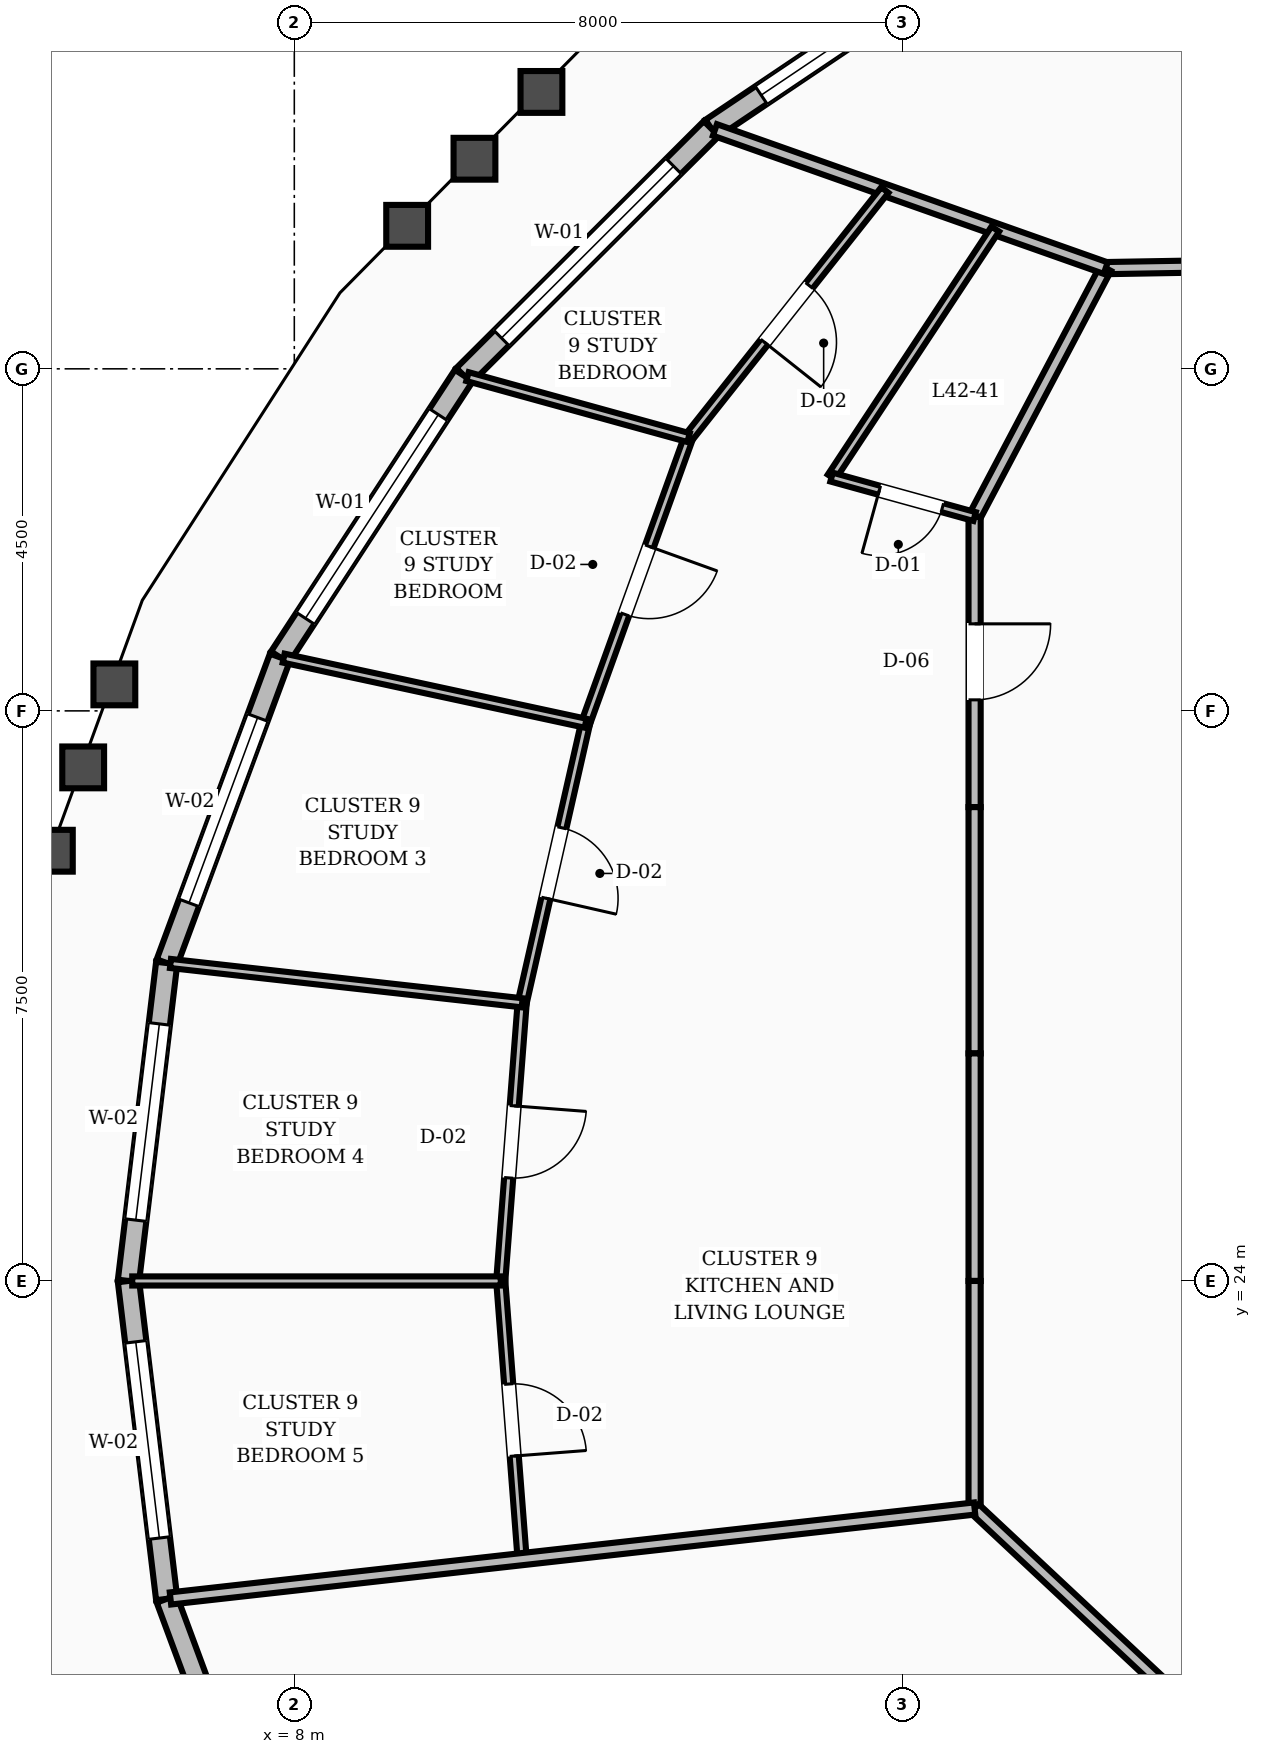
"""IFC4 building model, lengths in metres.
Left out: names, types, materials, properties, quantities, classifications, styles, units other than length and angle.
Written with IfcOpenShell. Run it as: python <this file> out.ifc"""

import sys

from ifc_helpers import new_model, si_unit, direction, frame, frame_2d, origin, place, context, subcontext, project, spatial, rectangle, extrude, element, fill, save


model = new_model("IFC4")
c1 = context("Model", 3, precision=1e-05, world=origin(), true_north=direction((0.0, 1.0)))
c2 = subcontext(c1, "Body", "Model", "MODEL_VIEW")
j1 = project(units=[si_unit("LENGTHUNIT", "METRE"), si_unit("PLANEANGLEUNIT", "RADIAN")], contexts=[c1])
p1 = place(None, origin())
s1 = spatial("IfcSite", under=j1, at=p1, CompositionType="ELEMENT")
p2 = place(p1, origin())
s2 = spatial("IfcBuilding", under=s1, at=p2, CompositionType="ELEMENT")
p3 = place(p2, frame((0.0, 0.0, 164.0)))
s3 = spatial("IfcBuildingStorey", under=s2, at=p3, CompositionType="ELEMENT", Elevation=164.0)
p4 = place(p3, frame((17.454, 41.826, 0.0), z_axis=(0.0, 0.0, 1.0), x_axis=(-0.829970169982, -0.55780777777, 0.0)))
e1 = element("IfcWall", 1, at=p4, inside=s3, PredefinedType="STANDARD", context=c2, shape_type="SweptSolid", body=[
    extrude(rectangle(XDim=4.78, YDim=0.28, at=frame_2d((2.39, 0.0))), origin(), (0.0, 0.0, 1.0), 2.82),
])
p5 = place(p4, frame((0.79, 0.0, 0.8)))
e2 = element("IfcOpeningElement", 2, at=p5, cuts=e1, PredefinedType="OPENING", context=c2, shape_type="SweptSolid", body=[
    extrude(rectangle(XDim=3.2, YDim=1.65, at=frame_2d((1.6, 0.825))), frame((0.0, 0.15, 0.0), z_axis=(0.0, -1.0, 0.0), x_axis=(1.0, 0.0, 0.0)), (0.0, 0.0, 1.0), 0.3),
])
p6 = place(p3, frame((13.486, 39.16, 0.0), z_axis=(0.0, 0.0, 1.0), x_axis=(-0.70790250433, -0.706310161589, 0.0)))
e3 = element("IfcWall", 3, at=p6, inside=s3, PredefinedType="STANDARD", context=c2, shape_type="SweptSolid", body=[
    extrude(rectangle(XDim=4.6, YDim=0.28, at=frame_2d((2.3, 0.0))), origin(), (0.0, 0.0, 1.0), 2.82),
])
p7 = place(p6, frame((0.7, 0.0, 0.8)))
e4 = element("IfcOpeningElement", 4, at=p7, cuts=e3, PredefinedType="OPENING", context=c2, shape_type="SweptSolid", body=[
    extrude(rectangle(XDim=3.2, YDim=1.65, at=frame_2d((1.6, 0.825))), frame((0.0, 0.15, 0.0), z_axis=(0.0, -1.0, 0.0), x_axis=(1.0, 0.0, 0.0)), (0.0, 0.0, 1.0), 0.3),
])
p8 = place(p3, frame((10.23, 35.911, 0.0), z_axis=(0.0, 0.0, 1.0), x_axis=(-0.546604237051, -0.837391072342, 0.0)))
e5 = element("IfcWall", 5, at=p8, inside=s3, PredefinedType="STANDARD", context=c2, shape_type="SweptSolid", body=[
    extrude(rectangle(XDim=4.426, YDim=0.28, at=frame_2d((2.213, 0.0))), origin(), (0.0, 0.0, 1.0), 2.82),
])
p9 = place(p8, frame((0.613, 0.0, 0.8)))
e6 = element("IfcOpeningElement", 6, at=p9, cuts=e5, PredefinedType="OPENING", context=c2, shape_type="SweptSolid", body=[
    extrude(rectangle(XDim=3.2, YDim=1.65, at=frame_2d((1.6, 0.825))), frame((0.0, 0.15, 0.0), z_axis=(0.0, -1.0, 0.0), x_axis=(1.0, 0.0, 0.0)), (0.0, 0.0, 1.0), 0.3),
])
p10 = place(p3, frame((7.811, 32.205, 0.0), z_axis=(0.0, 0.0, 1.0), x_axis=(-0.347390364115, -0.937720606002, 0.0)))
e7 = element("IfcWall", 7, at=p10, inside=s3, PredefinedType="STANDARD", context=c2, shape_type="SweptSolid", body=[
    extrude(rectangle(XDim=4.289, YDim=0.28, at=frame_2d((2.145, 0.0))), origin(), (0.0, 0.0, 1.0), 2.82),
])
p11 = place(p10, frame((0.844, 0.0, 0.8)))
e8 = element("IfcOpeningElement", 8, at=p11, cuts=e7, PredefinedType="OPENING", context=c2, shape_type="SweptSolid", body=[
    extrude(rectangle(XDim=2.6, YDim=1.65, at=frame_2d((1.3, 0.825))), frame((0.0, 0.15, 0.0), z_axis=(0.0, -1.0, 0.0), x_axis=(1.0, 0.0, 0.0)), (0.0, 0.0, 1.0), 0.3),
])
p12 = place(p3, frame((6.321, 28.183, 0.0), z_axis=(0.0, 0.0, 1.0), x_axis=(-0.119382878751, -0.992848290657, 0.0)))
e9 = element("IfcWall", 9, at=p12, inside=s3, PredefinedType="STANDARD", context=c2, shape_type="SweptSolid", body=[
    extrude(rectangle(XDim=4.213, YDim=0.28, at=frame_2d((2.106, 0.0))), origin(), (0.0, 0.0, 1.0), 2.82),
])
p13 = place(p12, frame((0.806, 0.0, 0.8)))
e10 = element("IfcOpeningElement", 10, at=p13, cuts=e9, PredefinedType="OPENING", context=c2, shape_type="SweptSolid", body=[
    extrude(rectangle(XDim=2.6, YDim=1.65, at=frame_2d((1.3, 0.825))), frame((0.0, 0.15, 0.0), z_axis=(0.0, -1.0, 0.0), x_axis=(1.0, 0.0, 0.0)), (0.0, 0.0, 1.0), 0.3),
])
p14 = place(p3, frame((5.818, 24.0, 0.0), z_axis=(0.0, 0.0, 1.0), x_axis=(0.119382878751, -0.992848290657, 0.0)))
e11 = element("IfcWall", 11, at=p14, inside=s3, PredefinedType="STANDARD", context=c2, shape_type="SweptSolid", body=[
    extrude(rectangle(XDim=4.213, YDim=0.28, at=frame_2d((2.106, 0.0))), origin(), (0.0, 0.0, 1.0), 2.82),
])
p15 = place(p14, frame((0.806, 0.0, 0.8)))
e12 = element("IfcOpeningElement", 12, at=p15, cuts=e11, PredefinedType="OPENING", context=c2, shape_type="SweptSolid", body=[
    extrude(rectangle(XDim=2.6, YDim=1.65, at=frame_2d((1.3, 0.825))), frame((0.0, 0.15, 0.0), z_axis=(0.0, -1.0, 0.0), x_axis=(1.0, 0.0, 0.0)), (0.0, 0.0, 1.0), 0.3),
])
p16 = place(p3, frame((6.321, 19.817, 0.0), z_axis=(0.0, 0.0, 1.0), x_axis=(0.347390364115, -0.937720606002, 0.0)))
e13 = element("IfcWall", 13, at=p16, inside=s3, PredefinedType="STANDARD", context=c2, shape_type="SweptSolid", body=[
    extrude(rectangle(XDim=4.289, YDim=0.28, at=frame_2d((2.145, 0.0))), origin(), (0.0, 0.0, 1.0), 2.82),
])
p17 = place(p3, frame((23.046, 37.4, 0.0), z_axis=(0.0, 0.0, 1.0), x_axis=(-0.999853038912, -0.017143528788, 0.0)))
e14 = element("IfcWall", 14, at=p17, inside=s3, PredefinedType="SOLIDWALL", context=c2, shape_type="SweptSolid", body=[
    extrude(rectangle(XDim=4.372, YDim=0.16, at=frame_2d((2.186, 0.0))), origin(), (0.0, 0.0, 1.0), 2.8),
])
p18 = place(p3, frame((18.675, 37.325, 0.0), z_axis=(0.0, 0.0, 1.0), x_axis=(-0.466737093093, -0.884396113702, 0.0)))
e15 = element("IfcWall", 15, at=p18, inside=s3, PredefinedType="SOLIDWALL", context=c2, shape_type="SweptSolid", body=[
    extrude(rectangle(XDim=3.696, YDim=0.16, at=frame_2d((1.848, 0.0))), origin(), (0.0, 0.0, 1.0), 2.8),
])
p19 = place(p3, frame((16.95, 34.056, 0.0), z_axis=(0.0, 0.0, 1.0), x_axis=(0.0, -1.0, 0.0)))
e16 = element("IfcWall", 16, at=p19, inside=s3, PredefinedType="SOLIDWALL", context=c2, shape_type="SweptSolid", body=[
    extrude(rectangle(XDim=3.822, YDim=0.16, at=frame_2d((1.911, 0.0))), origin(), (0.0, 0.0, 1.0), 2.8),
])
p20 = place(p19, frame((1.411, 0.0, 0.0)))
e17 = element("IfcOpeningElement", 17, at=p20, cuts=e16, PredefinedType="OPENING", context=c2, shape_type="SweptSolid", body=[
    extrude(rectangle(XDim=1.0, YDim=2.1, at=frame_2d((0.5, 1.05))), frame((0.0, 0.09, 0.0), z_axis=(0.0, -1.0, 0.0), x_axis=(1.0, 0.0, 0.0)), (0.0, 0.0, 1.0), 0.18),
])
p21 = place(p3, frame((16.95, 30.234, 0.0), z_axis=(0.0, 0.0, 1.0), x_axis=(0.0, -1.0, 0.0)))
e18 = element("IfcWall", 18, at=p21, inside=s3, PredefinedType="SOLIDWALL", context=c2, shape_type="SweptSolid", body=[
    extrude(rectangle(XDim=3.24, YDim=0.16, at=frame_2d((1.62, 0.0))), origin(), (0.0, 0.0, 1.0), 2.8),
])
for number, where, z_axis, x_axis in (
    (19, (16.95, 26.994, 0.0), (0.0, 0.0, 1.0), (0.0, -1.0, 0.0)),
    (20, (16.95, 24.0, 0.0), (0.0, 0.0, 1.0), (0.0, -1.0, 0.0)),
):
    element("IfcWall", number, at=place(p3, frame(where, z_axis=z_axis, x_axis=x_axis)), inside=s3, PredefinedType="SOLIDWALL", context=c2, shape_type="SweptSolid", body=[
        extrude(rectangle(XDim=2.994, YDim=0.16, at=frame_2d((1.497, 0.0))), origin(), (0.0, 0.0, 1.0), 2.8),
    ])
p22 = place(p3, frame((16.95, 21.006, 0.0), z_axis=(0.0, 0.0, 1.0), x_axis=(0.730150682073, -0.683286163674, 0.0)))
e21 = element("IfcWall", 21, at=p22, inside=s3, PredefinedType="SOLIDWALL", context=c2, shape_type="SweptSolid", body=[
    extrude(rectangle(XDim=3.287, YDim=0.16, at=frame_2d((1.644, 0.0))), origin(), (0.0, 0.0, 1.0), 2.8),
])
p23 = place(p3, frame((18.675, 37.325, 0.0), z_axis=(0.0, 0.0, 1.0), x_axis=(-0.942778570561, 0.333419505866, 0.0)))
e22 = element("IfcWall", 22, at=p23, inside=s3, PredefinedType="SOLIDWALL", context=c2, shape_type="SweptSolid", body=[
    extrude(rectangle(XDim=5.454, YDim=0.16, at=frame_2d((2.727, 0.0))), origin(), (0.0, 0.0, 1.0), 2.8),
])
p24 = place(p3, frame((17.222, 37.839, 0.0), z_axis=(0.0, 0.0, 1.0), x_axis=(-0.550789143957, -0.834644426627, 0.0)))
e23 = element("IfcWall", 23, at=p24, inside=s3, PredefinedType="PARTITIONING", context=c2, shape_type="SweptSolid", body=[
    extrude(rectangle(XDim=3.91, YDim=0.12, at=frame_2d((1.955, 0.0))), origin(), (0.0, 0.0, 1.0), 2.8),
])
p25 = place(p3, frame((16.95, 34.056, 0.0), z_axis=(0.0, 0.0, 1.0), x_axis=(-0.963953905702, 0.266069291128, 0.0)))
e24 = element("IfcWall", 24, at=p25, inside=s3, PredefinedType="PARTITIONING", context=c2, shape_type="SweptSolid", body=[
    extrude(rectangle(XDim=1.952, YDim=0.12, at=frame_2d((0.976, 0.0))), origin(), (0.0, 0.0, 1.0), 2.8),
])
p26 = place(p25, frame((0.44, 0.0, 0.0)))
e25 = element("IfcOpeningElement", 25, at=p26, cuts=e24, PredefinedType="OPENING", context=c2, shape_type="SweptSolid", body=[
    extrude(rectangle(XDim=0.86, YDim=2.1, at=frame_2d((0.43, 1.05))), frame((0.0, 0.07, 0.0), z_axis=(0.0, -1.0, 0.0), x_axis=(1.0, 0.0, 0.0)), (0.0, 0.0, 1.0), 0.14),
])
p27 = place(p3, frame((15.769, 38.353, 0.0), z_axis=(0.0, 0.0, 1.0), x_axis=(-0.621200750132, -0.783651471023, 0.0)))
e26 = element("IfcWall", 26, at=p27, inside=s3, PredefinedType="PARTITIONING", context=c2, shape_type="SweptSolid", body=[
    extrude(rectangle(XDim=4.157, YDim=0.12, at=frame_2d((2.079, 0.0))), origin(), (0.0, 0.0, 1.0), 2.8),
])
p28 = place(p27, frame((1.604, 0.0, 0.0)))
e27 = element("IfcOpeningElement", 27, at=p28, cuts=e26, PredefinedType="OPENING", context=c2, shape_type="SweptSolid", body=[
    extrude(rectangle(XDim=0.95, YDim=2.1, at=frame_2d((0.475, 1.05))), frame((0.0, 0.07, 0.0), z_axis=(0.0, -1.0, 0.0), x_axis=(1.0, 0.0, 0.0)), (0.0, 0.0, 1.0), 0.14),
])
p29 = place(p3, frame((13.187, 35.095, 0.0), z_axis=(0.0, 0.0, 1.0), x_axis=(-0.339219380109, -0.940707293561, 0.0)))
e28 = element("IfcWall", 28, at=p29, inside=s3, PredefinedType="PARTITIONING", context=c2, shape_type="SweptSolid", body=[
    extrude(rectangle(XDim=3.994, YDim=0.12, at=frame_2d((1.997, 0.0))), origin(), (0.0, 0.0, 1.0), 2.8),
])
p30 = place(p29, frame((1.522, 0.0, 0.0)))
e29 = element("IfcOpeningElement", 29, at=p30, cuts=e28, PredefinedType="OPENING", context=c2, shape_type="SweptSolid", body=[
    extrude(rectangle(XDim=0.95, YDim=2.1, at=frame_2d((0.475, 1.05))), frame((0.0, 0.07, 0.0), z_axis=(0.0, -1.0, 0.0), x_axis=(1.0, 0.0, 0.0)), (0.0, 0.0, 1.0), 0.14),
])
p31 = place(p3, frame((13.187, 35.095, 0.0), z_axis=(0.0, 0.0, 1.0), x_axis=(-0.96395827654, 0.266053455323, 0.0)))
e30 = element("IfcWall", 30, at=p31, inside=s3, PredefinedType="PARTITIONING", context=c2, shape_type="SweptSolid", body=[
    extrude(rectangle(XDim=3.017, YDim=0.12, at=frame_2d((1.509, 0.0))), origin(), (0.0, 0.0, 1.0), 2.8),
])
p32 = place(p3, frame((11.832, 31.337, 0.0), z_axis=(0.0, 0.0, 1.0), x_axis=(-0.221198590076, -0.975228785336, 0.0)))
e31 = element("IfcWall", 31, at=p32, inside=s3, PredefinedType="PARTITIONING", context=c2, shape_type="SweptSolid", body=[
    extrude(rectangle(XDim=3.771, YDim=0.12, at=frame_2d((1.886, 0.0))), origin(), (0.0, 0.0, 1.0), 2.8),
])
p33 = place(p32, frame((1.411, 0.0, 0.0)))
e32 = element("IfcOpeningElement", 32, at=p33, cuts=e31, PredefinedType="OPENING", context=c2, shape_type="SweptSolid", body=[
    extrude(rectangle(XDim=0.95, YDim=2.1, at=frame_2d((0.475, 1.05))), frame((0.0, 0.07, 0.0), z_axis=(0.0, -1.0, 0.0), x_axis=(1.0, 0.0, 0.0)), (0.0, 0.0, 1.0), 0.14),
])
p34 = place(p3, frame((11.832, 31.337, 0.0), z_axis=(0.0, 0.0, 1.0), x_axis=(-0.977526385001, 0.210813108289, 0.0)))
e33 = element("IfcWall", 33, at=p34, inside=s3, PredefinedType="PARTITIONING", context=c2, shape_type="SweptSolid", body=[
    extrude(rectangle(XDim=4.064, YDim=0.12, at=frame_2d((2.032, 0.0))), origin(), (0.0, 0.0, 1.0), 2.8),
])
p35 = place(p3, frame((10.998, 27.659, 0.0), z_axis=(0.0, 0.0, 1.0), x_axis=(-0.07676262617, -0.997049396582, 0.0)))
e34 = element("IfcWall", 34, at=p35, inside=s3, PredefinedType="PARTITIONING", context=c2, shape_type="SweptSolid", body=[
    extrude(rectangle(XDim=3.67, YDim=0.12, at=frame_2d((1.835, 0.0))), origin(), (0.0, 0.0, 1.0), 2.8),
])
p36 = place(p35, frame((1.36, 0.0, 0.0)))
e35 = element("IfcOpeningElement", 35, at=p36, cuts=e34, PredefinedType="OPENING", context=c2, shape_type="SweptSolid", body=[
    extrude(rectangle(XDim=0.95, YDim=2.1, at=frame_2d((0.475, 1.05))), frame((0.0, 0.07, 0.0), z_axis=(0.0, -1.0, 0.0), x_axis=(1.0, 0.0, 0.0)), (0.0, 0.0, 1.0), 0.14),
])
p37 = place(p3, frame((10.998, 27.659, 0.0), z_axis=(0.0, 0.0, 1.0), x_axis=(-0.993802255483, 0.111162390209, 0.0)))
e36 = element("IfcWall", 36, at=p37, inside=s3, PredefinedType="PARTITIONING", context=c2, shape_type="SweptSolid", body=[
    extrude(rectangle(XDim=4.656, YDim=0.12, at=frame_2d((2.328, 0.0))), origin(), (0.0, 0.0, 1.0), 2.8),
])
p38 = place(p3, frame((10.716, 24.0, 0.0), z_axis=(0.0, 0.0, 1.0), x_axis=(0.07676262617, -0.997049396582, 0.0)))
e37 = element("IfcWall", 37, at=p38, inside=s3, PredefinedType="PARTITIONING", context=c2, shape_type="SweptSolid", body=[
    extrude(rectangle(XDim=3.67, YDim=0.12, at=frame_2d((1.835, 0.0))), origin(), (0.0, 0.0, 1.0), 2.8),
])
p39 = place(p38, frame((1.36, 0.0, 0.0)))
e38 = element("IfcOpeningElement", 38, at=p39, cuts=e37, PredefinedType="OPENING", context=c2, shape_type="SweptSolid", body=[
    extrude(rectangle(XDim=0.95, YDim=2.1, at=frame_2d((0.475, 1.05))), frame((0.0, 0.07, 0.0), z_axis=(0.0, -1.0, 0.0), x_axis=(1.0, 0.0, 0.0)), (0.0, 0.0, 1.0), 0.14),
])
p40 = place(p3, frame((10.716, 24.0, 0.0), z_axis=(0.0, 0.0, 1.0), x_axis=(-1.0, 0.0, 0.0)))
e39 = element("IfcWall", 39, at=p40, inside=s3, PredefinedType="PARTITIONING", context=c2, shape_type="SweptSolid", body=[
    extrude(rectangle(XDim=4.848, YDim=0.12, at=frame_2d((2.424, 0.0))), origin(), (0.0, 0.0, 1.0), 2.8),
])
p41 = place(p3, frame((16.95, 21.006, 0.0), z_axis=(0.0, 0.0, 1.0), x_axis=(-0.993802358281, -0.111161471179, 0.0)))
e40 = element("IfcWall", 40, at=p41, inside=s3, PredefinedType="SOLIDWALL", context=c2, shape_type="SweptSolid", body=[
    extrude(rectangle(XDim=10.645, YDim=0.16, at=frame_2d((5.323, 0.0))), origin(), (0.0, 0.0, 1.0), 2.8),
])
p42 = place(p5, origin())
e41 = element("IfcWindow", 41, at=p42, inside=s3, PartitioningType="SINGLE_PANEL", PredefinedType="WINDOW", context=c2, shape_type="SweptSolid", body=[
    extrude(rectangle(XDim=3.2, YDim=1.65, at=frame_2d((1.6, 0.825))), frame((0.0, 0.03, 0.0), z_axis=(0.0, -1.0, 0.0), x_axis=(1.0, 0.0, 0.0)), (0.0, 0.0, 1.0), 0.06),
])
fill(e2, e41)
p43 = place(p7, origin())
e42 = element("IfcWindow", 42, at=p43, inside=s3, PartitioningType="SINGLE_PANEL", PredefinedType="WINDOW", context=c2, shape_type="SweptSolid", body=[
    extrude(rectangle(XDim=3.2, YDim=1.65, at=frame_2d((1.6, 0.825))), frame((0.0, 0.03, 0.0), z_axis=(0.0, -1.0, 0.0), x_axis=(1.0, 0.0, 0.0)), (0.0, 0.0, 1.0), 0.06),
])
fill(e4, e42)
p44 = place(p9, origin())
e43 = element("IfcWindow", 43, at=p44, inside=s3, PartitioningType="SINGLE_PANEL", PredefinedType="WINDOW", context=c2, shape_type="SweptSolid", body=[
    extrude(rectangle(XDim=3.2, YDim=1.65, at=frame_2d((1.6, 0.825))), frame((0.0, 0.03, 0.0), z_axis=(0.0, -1.0, 0.0), x_axis=(1.0, 0.0, 0.0)), (0.0, 0.0, 1.0), 0.06),
])
fill(e6, e43)
p45 = place(p11, origin())
e44 = element("IfcWindow", 44, at=p45, inside=s3, PartitioningType="SINGLE_PANEL", PredefinedType="WINDOW", context=c2, shape_type="SweptSolid", body=[
    extrude(rectangle(XDim=2.6, YDim=1.65, at=frame_2d((1.3, 0.825))), frame((0.0, 0.03, 0.0), z_axis=(0.0, -1.0, 0.0), x_axis=(1.0, 0.0, 0.0)), (0.0, 0.0, 1.0), 0.06),
])
fill(e8, e44)
p46 = place(p13, origin())
e45 = element("IfcWindow", 45, at=p46, inside=s3, PartitioningType="SINGLE_PANEL", PredefinedType="WINDOW", context=c2, shape_type="SweptSolid", body=[
    extrude(rectangle(XDim=2.6, YDim=1.65, at=frame_2d((1.3, 0.825))), frame((0.0, 0.03, 0.0), z_axis=(0.0, -1.0, 0.0), x_axis=(1.0, 0.0, 0.0)), (0.0, 0.0, 1.0), 0.06),
])
fill(e10, e45)
p47 = place(p15, origin())
e46 = element("IfcWindow", 46, at=p47, inside=s3, PartitioningType="SINGLE_PANEL", PredefinedType="WINDOW", context=c2, shape_type="SweptSolid", body=[
    extrude(rectangle(XDim=2.6, YDim=1.65, at=frame_2d((1.3, 0.825))), frame((0.0, 0.03, 0.0), z_axis=(0.0, -1.0, 0.0), x_axis=(1.0, 0.0, 0.0)), (0.0, 0.0, 1.0), 0.06),
])
fill(e12, e46)
p48 = place(p26, origin())
e47 = element("IfcDoor", 47, at=p48, inside=s3, OperationType="SINGLE_SWING_RIGHT", PredefinedType="DOOR", context=c2, shape_type="SweptSolid", body=[
    extrude(rectangle(XDim=0.86, YDim=2.1, at=frame_2d((0.43, 1.05))), frame((0.0, 0.025, 0.0), z_axis=(0.0, -1.0, 0.0), x_axis=(1.0, 0.0, 0.0)), (0.0, 0.0, 1.0), 0.05),
])
fill(e25, e47)
p49 = place(p20, origin())
e48 = element("IfcDoor", 48, at=p49, inside=s3, OperationType="SINGLE_SWING_LEFT", PredefinedType="DOOR", context=c2, shape_type="SweptSolid", body=[
    extrude(rectangle(XDim=1.0, YDim=2.1, at=frame_2d((0.5, 1.05))), frame((0.0, 0.025, 0.0), z_axis=(0.0, -1.0, 0.0), x_axis=(1.0, 0.0, 0.0)), (0.0, 0.0, 1.0), 0.05),
])
fill(e17, e48)
p50 = place(p28, origin())
e49 = element("IfcDoor", 49, at=p50, inside=s3, OperationType="SINGLE_SWING_RIGHT", PredefinedType="DOOR", context=c2, shape_type="SweptSolid", body=[
    extrude(rectangle(XDim=0.95, YDim=2.1, at=frame_2d((0.475, 1.05))), frame((0.0, 0.025, 0.0), z_axis=(0.0, -1.0, 0.0), x_axis=(1.0, 0.0, 0.0)), (0.0, 0.0, 1.0), 0.05),
])
fill(e27, e49)
p51 = place(p30, origin())
e50 = element("IfcDoor", 50, at=p51, inside=s3, OperationType="SINGLE_SWING_LEFT", PredefinedType="DOOR", context=c2, shape_type="SweptSolid", body=[
    extrude(rectangle(XDim=0.95, YDim=2.1, at=frame_2d((0.475, 1.05))), frame((0.0, 0.025, 0.0), z_axis=(0.0, -1.0, 0.0), x_axis=(1.0, 0.0, 0.0)), (0.0, 0.0, 1.0), 0.05),
])
fill(e29, e50)
p52 = place(p33, origin())
e51 = element("IfcDoor", 51, at=p52, inside=s3, OperationType="SINGLE_SWING_RIGHT", PredefinedType="DOOR", context=c2, shape_type="SweptSolid", body=[
    extrude(rectangle(XDim=0.95, YDim=2.1, at=frame_2d((0.475, 1.05))), frame((0.0, 0.025, 0.0), z_axis=(0.0, -1.0, 0.0), x_axis=(1.0, 0.0, 0.0)), (0.0, 0.0, 1.0), 0.05),
])
fill(e32, e51)
p53 = place(p36, origin())
e52 = element("IfcDoor", 52, at=p53, inside=s3, OperationType="SINGLE_SWING_LEFT", PredefinedType="DOOR", context=c2, shape_type="SweptSolid", body=[
    extrude(rectangle(XDim=0.95, YDim=2.1, at=frame_2d((0.475, 1.05))), frame((0.0, 0.025, 0.0), z_axis=(0.0, -1.0, 0.0), x_axis=(1.0, 0.0, 0.0)), (0.0, 0.0, 1.0), 0.05),
])
fill(e35, e52)
p54 = place(p39, origin())
e53 = element("IfcDoor", 53, at=p54, inside=s3, OperationType="SINGLE_SWING_RIGHT", PredefinedType="DOOR", context=c2, shape_type="SweptSolid", body=[
    extrude(rectangle(XDim=0.95, YDim=2.1, at=frame_2d((0.475, 1.05))), frame((0.0, 0.025, 0.0), z_axis=(0.0, -1.0, 0.0), x_axis=(1.0, 0.0, 0.0)), (0.0, 0.0, 1.0), 0.05),
])
fill(e38, e53)
save(model, sys.argv[1])
